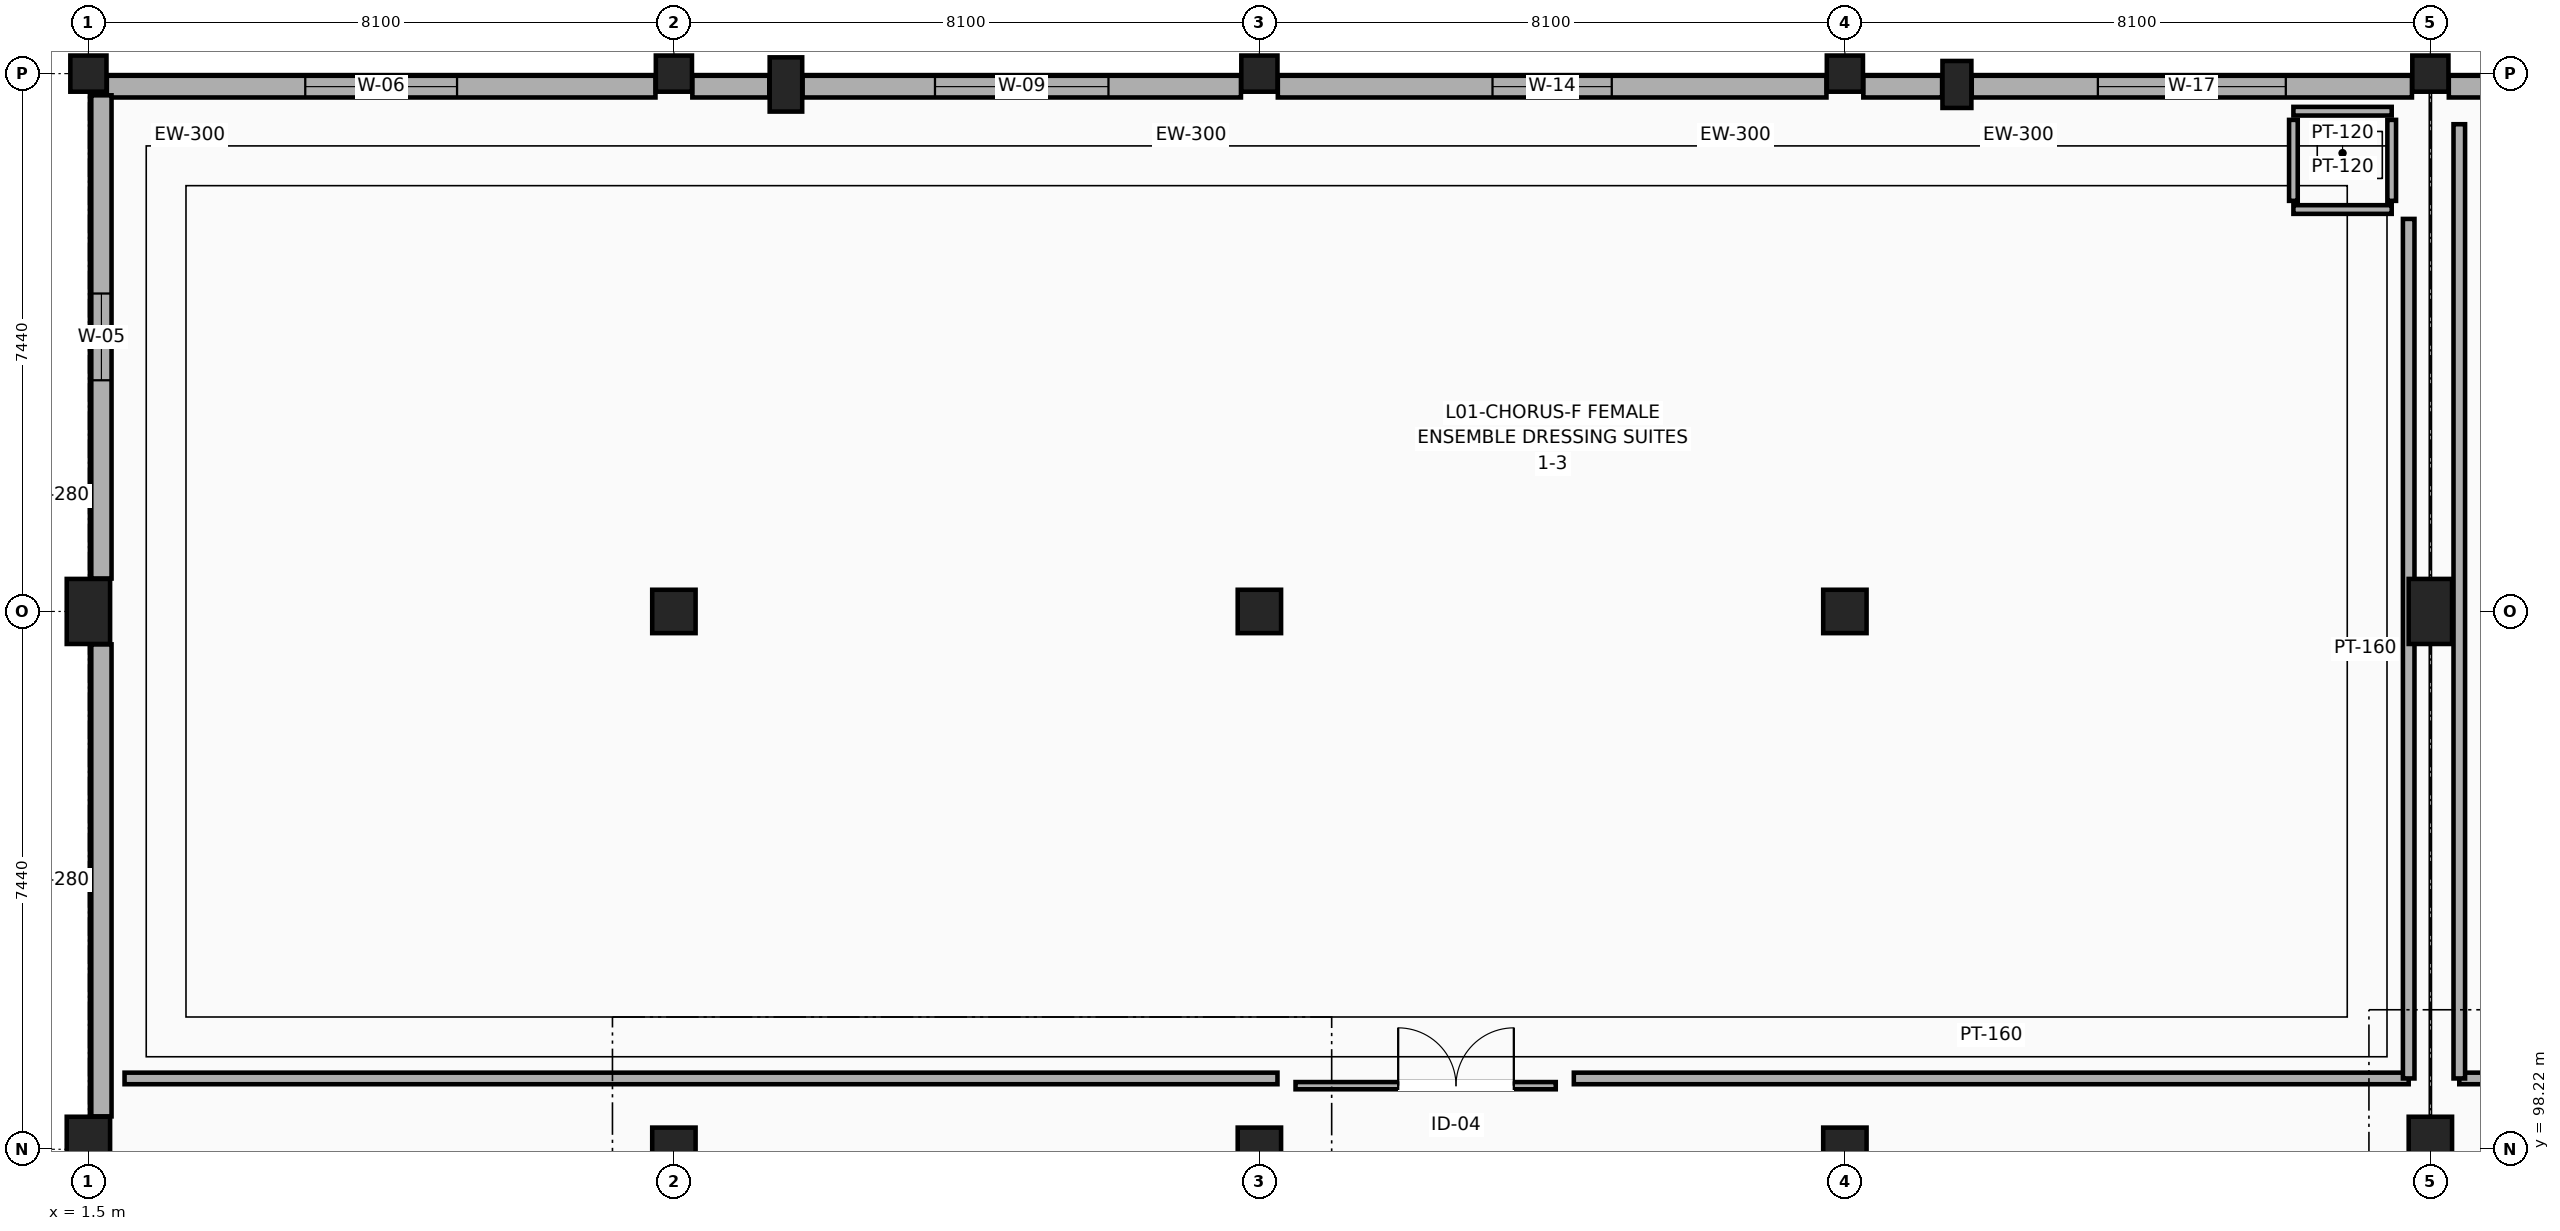
"""IFC4 building model, lengths in metres.
Left out: names, types, materials, properties, quantities, classifications, styles, units other than length and angle.
Written with IfcOpenShell. Run it as: python <this file> out.ifc"""

import sys

from ifc_helpers import new_model, si_unit, direction, frame, frame_2d, origin, origin_2d, place, context, subcontext, project, spatial, rectangle, extrude, element, fill, save


model = new_model("IFC4")
c1 = context("Model", 3, precision=1e-05, world=origin(), true_north=direction((0.0, 1.0)))
c2 = subcontext(c1, "Body", "Model", "MODEL_VIEW")
j1 = project(units=[si_unit("LENGTHUNIT", "METRE"), si_unit("PLANEANGLEUNIT", "RADIAN")], contexts=[c1])
p1 = place(None, origin())
s1 = spatial("IfcSite", under=j1, at=p1, CompositionType="ELEMENT")
p2 = place(p1, origin())
s2 = spatial("IfcBuilding", under=s1, at=p2, CompositionType="ELEMENT")
p3 = place(p2, frame((0.0, 0.0, 5.4)))
s3 = spatial("IfcBuildingStorey", under=s2, at=p3, CompositionType="ELEMENT", Elevation=5.4)
p4 = place(p3, frame((11.15, 112.95, 0.0), z_axis=(0.0, 0.0, 1.0), x_axis=(1.0, 0.0, 0.0)))
e1 = element("IfcColumn", 1, at=p4, inside=s3, PredefinedType="PILASTER", context=c2, shape_type="SweptSolid", body=[
    extrude(rectangle(XDim=0.45, YDim=0.75, at=origin_2d()), origin(), (0.0, 0.0, 1.0), 4.8),
])
p5 = place(p3, frame((27.35, 112.95, 0.0), z_axis=(0.0, 0.0, 1.0), x_axis=(1.0, 0.0, 0.0)))
e2 = element("IfcColumn", 2, at=p5, inside=s3, PredefinedType="PILASTER", context=c2, shape_type="SweptSolid", body=[
    extrude(rectangle(XDim=0.4, YDim=0.65, at=origin_2d()), origin(), (0.0, 0.0, 1.0), 4.8),
])
for number, where, z_axis, x_axis in (
    (3, (1.5, 98.22, 0.0), (0.0, 0.0, 1.0), (1.0, 0.0, 0.0)),
    (4, (1.5, 105.66, 0.0), (0.0, 0.0, 1.0), (1.0, 0.0, 0.0)),
):
    element("IfcColumn", number, at=place(p3, frame(where, z_axis=z_axis, x_axis=x_axis)), inside=s3, PredefinedType="COLUMN", context=c2, shape_type="SweptSolid", body=[
        extrude(rectangle(XDim=0.6, YDim=0.9, at=origin_2d()), origin(), (0.0, 0.0, 1.0), 4.8),
    ])
p6 = place(p3, frame((1.5, 113.1, 0.0), z_axis=(0.0, 0.0, 1.0), x_axis=(1.0, 0.0, 0.0)))
e5 = element("IfcColumn", 5, at=p6, inside=s3, PredefinedType="COLUMN", context=c2, shape_type="SweptSolid", body=[
    extrude(rectangle(XDim=0.5, YDim=0.5, at=origin_2d()), origin(), (0.0, 0.0, 1.0), 4.8),
])
for number, where, z_axis, x_axis in (
    (6, (9.6, 98.22, 0.0), (0.0, 0.0, 1.0), (1.0, 0.0, 0.0)),
    (7, (9.6, 105.66, 0.0), (0.0, 0.0, 1.0), (1.0, 0.0, 0.0)),
):
    element("IfcColumn", number, at=place(p3, frame(where, z_axis=z_axis, x_axis=x_axis)), inside=s3, PredefinedType="COLUMN", context=c2, shape_type="SweptSolid", body=[
        extrude(rectangle(XDim=0.6, YDim=0.6, at=origin_2d()), origin(), (0.0, 0.0, 1.0), 4.8),
    ])
p7 = place(p3, frame((9.6, 113.1, 0.0), z_axis=(0.0, 0.0, 1.0), x_axis=(1.0, 0.0, 0.0)))
e8 = element("IfcColumn", 8, at=p7, inside=s3, PredefinedType="COLUMN", context=c2, shape_type="SweptSolid", body=[
    extrude(rectangle(XDim=0.5, YDim=0.5, at=origin_2d()), origin(), (0.0, 0.0, 1.0), 4.8),
])
for number, where, z_axis, x_axis in (
    (9, (17.7, 98.22, 0.0), (0.0, 0.0, 1.0), (1.0, 0.0, 0.0)),
    (10, (17.7, 105.66, 0.0), (0.0, 0.0, 1.0), (1.0, 0.0, 0.0)),
):
    element("IfcColumn", number, at=place(p3, frame(where, z_axis=z_axis, x_axis=x_axis)), inside=s3, PredefinedType="COLUMN", context=c2, shape_type="SweptSolid", body=[
        extrude(rectangle(XDim=0.6, YDim=0.6, at=origin_2d()), origin(), (0.0, 0.0, 1.0), 4.8),
    ])
p8 = place(p3, frame((17.7, 113.1, 0.0), z_axis=(0.0, 0.0, 1.0), x_axis=(1.0, 0.0, 0.0)))
e11 = element("IfcColumn", 11, at=p8, inside=s3, PredefinedType="COLUMN", context=c2, shape_type="SweptSolid", body=[
    extrude(rectangle(XDim=0.5, YDim=0.5, at=origin_2d()), origin(), (0.0, 0.0, 1.0), 4.8),
])
for number, where, z_axis, x_axis in (
    (12, (25.8, 98.22, 0.0), (0.0, 0.0, 1.0), (1.0, 0.0, 0.0)),
    (13, (25.8, 105.66, 0.0), (0.0, 0.0, 1.0), (1.0, 0.0, 0.0)),
):
    element("IfcColumn", number, at=place(p3, frame(where, z_axis=z_axis, x_axis=x_axis)), inside=s3, PredefinedType="COLUMN", context=c2, shape_type="SweptSolid", body=[
        extrude(rectangle(XDim=0.6, YDim=0.6, at=origin_2d()), origin(), (0.0, 0.0, 1.0), 4.8),
    ])
p9 = place(p3, frame((25.8, 113.1, 0.0), z_axis=(0.0, 0.0, 1.0), x_axis=(1.0, 0.0, 0.0)))
e14 = element("IfcColumn", 14, at=p9, inside=s3, PredefinedType="COLUMN", context=c2, shape_type="SweptSolid", body=[
    extrude(rectangle(XDim=0.5, YDim=0.5, at=origin_2d()), origin(), (0.0, 0.0, 1.0), 4.8),
])
for number, where, z_axis, x_axis in (
    (15, (33.9, 98.22, 0.0), (0.0, 0.0, 1.0), (1.0, 0.0, 0.0)),
    (16, (33.9, 105.66, 0.0), (0.0, 0.0, 1.0), (1.0, 0.0, 0.0)),
):
    element("IfcColumn", number, at=place(p3, frame(where, z_axis=z_axis, x_axis=x_axis)), inside=s3, PredefinedType="COLUMN", context=c2, shape_type="SweptSolid", body=[
        extrude(rectangle(XDim=0.6, YDim=0.9, at=origin_2d()), origin(), (0.0, 0.0, 1.0), 4.8),
    ])
p10 = place(p3, frame((33.9, 113.1, 0.0), z_axis=(0.0, 0.0, 1.0), x_axis=(1.0, 0.0, 0.0)))
e17 = element("IfcColumn", 17, at=p10, inside=s3, PredefinedType="COLUMN", context=c2, shape_type="SweptSolid", body=[
    extrude(rectangle(XDim=0.5, YDim=0.5, at=origin_2d()), origin(), (0.0, 0.0, 1.0), 4.8),
])
p11 = place(p3, frame((1.755, 112.92, 0.0), z_axis=(0.0, 0.0, 1.0), x_axis=(1.0, 0.0, 0.0)))
e18 = element("IfcWall", 18, at=p11, inside=s3, PredefinedType="SOLIDWALL", context=c2, shape_type="SweptSolid", body=[
    extrude(rectangle(XDim=7.59, YDim=0.3, at=frame_2d((3.795, 0.0))), origin(), (0.0, 0.0, 1.0), 3.637),
])
p12 = place(p11, frame((2.745, 0.0, 0.9)))
e19 = element("IfcOpeningElement", 19, at=p12, cuts=e18, PredefinedType="OPENING", context=c2, shape_type="SweptSolid", body=[
    extrude(rectangle(XDim=2.1, YDim=1.5, at=frame_2d((1.05, 0.75))), frame((0.0, 0.16, 0.0), z_axis=(0.0, -1.0, 0.0), x_axis=(1.0, 0.0, 0.0)), (0.0, 0.0, 1.0), 0.32),
])
p13 = place(p3, frame((11.38, 112.92, 0.0), z_axis=(0.0, 0.0, 1.0), x_axis=(1.0, 0.0, 0.0)))
e20 = element("IfcWall", 20, at=p13, inside=s3, PredefinedType="SOLIDWALL", context=c2, shape_type="SweptSolid", body=[
    extrude(rectangle(XDim=6.065, YDim=0.3, at=frame_2d((3.033, 0.0))), origin(), (0.0, 0.0, 1.0), 3.637),
])
p14 = place(p13, frame((1.832, 0.0, 0.9)))
e21 = element("IfcOpeningElement", 21, at=p14, cuts=e20, PredefinedType="OPENING", context=c2, shape_type="SweptSolid", body=[
    extrude(rectangle(XDim=2.4, YDim=2.4, at=frame_2d((1.2, 1.2))), frame((0.0, 0.16, 0.0), z_axis=(0.0, -1.0, 0.0), x_axis=(1.0, 0.0, 0.0)), (0.0, 0.0, 1.0), 0.32),
])
p15 = place(p3, frame((9.855, 112.92, 0.0), z_axis=(0.0, 0.0, 1.0), x_axis=(1.0, 0.0, 0.0)))
e22 = element("IfcWall", 22, at=p15, inside=s3, PredefinedType="SOLIDWALL", context=c2, shape_type="SweptSolid", body=[
    extrude(rectangle(XDim=1.065, YDim=0.3, at=frame_2d((0.532, 0.0))), origin(), (0.0, 0.0, 1.0), 3.637),
])
p16 = place(p3, frame((17.955, 112.92, 0.0), z_axis=(0.0, 0.0, 1.0), x_axis=(1.0, 0.0, 0.0)))
e23 = element("IfcWall", 23, at=p16, inside=s3, PredefinedType="SOLIDWALL", context=c2, shape_type="SweptSolid", body=[
    extrude(rectangle(XDim=7.59, YDim=0.3, at=frame_2d((3.795, 0.0))), origin(), (0.0, 0.0, 1.0), 3.637),
])
p17 = place(p16, frame((2.97, 0.0, 0.9)))
e24 = element("IfcOpeningElement", 24, at=p17, cuts=e23, PredefinedType="OPENING", context=c2, shape_type="SweptSolid", body=[
    extrude(rectangle(XDim=1.65, YDim=2.25, at=frame_2d((0.825, 1.125))), frame((0.0, 0.16, 0.0), z_axis=(0.0, -1.0, 0.0), x_axis=(1.0, 0.0, 0.0)), (0.0, 0.0, 1.0), 0.32),
])
p18 = place(p3, frame((27.555, 112.92, 0.0), z_axis=(0.0, 0.0, 1.0), x_axis=(1.0, 0.0, 0.0)))
e25 = element("IfcWall", 25, at=p18, inside=s3, PredefinedType="SOLIDWALL", context=c2, shape_type="SweptSolid", body=[
    extrude(rectangle(XDim=6.09, YDim=0.3, at=frame_2d((3.045, 0.0))), origin(), (0.0, 0.0, 1.0), 3.637),
])
p19 = place(p18, frame((1.745, 0.0, 0.9)))
e26 = element("IfcOpeningElement", 26, at=p19, cuts=e25, PredefinedType="OPENING", context=c2, shape_type="SweptSolid", body=[
    extrude(rectangle(XDim=2.6, YDim=2.1, at=frame_2d((1.3, 1.05))), frame((0.0, 0.16, 0.0), z_axis=(0.0, -1.0, 0.0), x_axis=(1.0, 0.0, 0.0)), (0.0, 0.0, 1.0), 0.32),
])
p20 = place(p3, frame((26.055, 112.92, 0.0), z_axis=(0.0, 0.0, 1.0), x_axis=(1.0, 0.0, 0.0)))
e27 = element("IfcWall", 27, at=p20, inside=s3, PredefinedType="SOLIDWALL", context=c2, shape_type="SweptSolid", body=[
    extrude(rectangle(XDim=1.09, YDim=0.3, at=frame_2d((0.545, 0.0))), origin(), (0.0, 0.0, 1.0), 3.637),
])
p21 = place(p3, frame((34.155, 112.92, 0.0), z_axis=(0.0, 0.0, 1.0), x_axis=(1.0, 0.0, 0.0)))
e28 = element("IfcWall", 28, at=p21, inside=s3, PredefinedType="SOLIDWALL", context=c2, shape_type="SweptSolid", body=[
    extrude(rectangle(XDim=1.065, YDim=0.3, at=frame_2d((0.532, 0.0))), origin(), (0.0, 0.0, 1.0), 3.637),
])
p22 = place(p3, frame((1.68, 98.675, 0.0), z_axis=(0.0, 0.0, 1.0), x_axis=(0.0, 1.0, 0.0)))
e29 = element("IfcWall", 29, at=p22, inside=s3, PredefinedType="SOLIDWALL", context=c2, shape_type="SweptSolid", body=[
    extrude(rectangle(XDim=6.53, YDim=0.28, at=frame_2d((3.265, 0.0))), origin(), (0.0, 0.0, 1.0), 4.187),
])
p23 = place(p3, frame((1.68, 106.115, 0.0), z_axis=(0.0, 0.0, 1.0), x_axis=(0.0, 1.0, 0.0)))
e30 = element("IfcWall", 30, at=p23, inside=s3, PredefinedType="SOLIDWALL", context=c2, shape_type="SweptSolid", body=[
    extrude(rectangle(XDim=6.685, YDim=0.28, at=frame_2d((3.343, 0.0))), origin(), (0.0, 0.0, 1.0), 4.187),
])
p24 = place(p23, frame((2.743, 0.0, 0.95)))
e31 = element("IfcOpeningElement", 31, at=p24, cuts=e30, PredefinedType="OPENING", context=c2, shape_type="SweptSolid", body=[
    extrude(rectangle(XDim=1.2, YDim=1.8, at=frame_2d((0.6, 0.9))), frame((0.0, 0.15, 0.0), z_axis=(0.0, -1.0, 0.0), x_axis=(1.0, 0.0, 0.0)), (0.0, 0.0, 1.0), 0.3),
])
for number, where, z_axis, x_axis in (
    (32, (32.005, 111.22, 0.0), (0.0, 0.0, 1.0), (1.0, 0.0, 0.0)),
    (33, (32.005, 112.58, 0.0), (0.0, 0.0, 1.0), (1.0, 0.0, 0.0)),
):
    element("IfcWall", number, at=place(p3, frame(where, z_axis=z_axis, x_axis=x_axis)), inside=s3, PredefinedType="PARTITIONING", context=c2, shape_type="SweptSolid", body=[
        extrude(rectangle(XDim=1.36, YDim=0.12, at=frame_2d((0.68, 0.0))), origin(), (0.0, 0.0, 1.0), 4.505),
    ])
for number, where, z_axis, x_axis in (
    (34, (32.005, 111.34, 0.0), (0.0, 0.0, 1.0), (0.0, 1.0, 0.0)),
    (35, (33.365, 111.34, 0.0), (0.0, 0.0, 1.0), (0.0, 1.0, 0.0)),
):
    element("IfcWall", number, at=place(p3, frame(where, z_axis=z_axis, x_axis=x_axis)), inside=s3, PredefinedType="PARTITIONING", context=c2, shape_type="SweptSolid", body=[
        extrude(rectangle(XDim=1.12, YDim=0.12, at=frame_2d((0.56, 0.0))), origin(), (0.0, 0.0, 1.0), 4.505),
    ])
p25 = place(p3, frame((18.2, 99.1, 0.0), z_axis=(0.0, 0.0, 1.0), x_axis=(1.0, 0.0, 0.0)))
e36 = element("IfcWall", 36, at=p25, inside=s3, PredefinedType="PARTITIONING", context=c2, shape_type="SweptSolid", body=[
    extrude(rectangle(XDim=3.6, YDim=0.1, at=frame_2d((1.8, 0.0))), origin(), (0.0, 0.0, 1.0), 4.187),
])
p26 = place(p25, frame((1.42, 0.0, 0.0)))
e37 = element("IfcOpeningElement", 37, at=p26, cuts=e36, PredefinedType="OPENING", context=c2, shape_type="SweptSolid", body=[
    extrude(rectangle(XDim=1.6, YDim=2.3, at=frame_2d((0.8, 1.15))), frame((0.0, 0.06, 0.0), z_axis=(0.0, -1.0, 0.0), x_axis=(1.0, 0.0, 0.0)), (0.0, 0.0, 1.0), 0.12),
])
p27 = place(p3, frame((2.0, 99.2, 0.0), z_axis=(0.0, 0.0, 1.0), x_axis=(1.0, 0.0, 0.0)))
e38 = element("IfcWall", 38, at=p27, inside=s3, PredefinedType="PARTITIONING", context=c2, shape_type="SweptSolid", body=[
    extrude(rectangle(XDim=15.95, YDim=0.16, at=frame_2d((7.975, 0.0))), origin(), (0.0, 0.0, 1.0), 3.837),
])
p28 = place(p3, frame((22.05, 99.2, 0.0), z_axis=(0.0, 0.0, 1.0), x_axis=(1.0, 0.0, 0.0)))
e39 = element("IfcWall", 39, at=p28, inside=s3, PredefinedType="PARTITIONING", context=c2, shape_type="SweptSolid", body=[
    extrude(rectangle(XDim=11.55, YDim=0.16, at=frame_2d((5.775, 0.0))), origin(), (0.0, 0.0, 1.0), 3.837),
])
p29 = place(p3, frame((33.6, 99.2, 0.0), z_axis=(0.0, 0.0, 1.0), x_axis=(0.0, 1.0, 0.0)))
e40 = element("IfcWall", 40, at=p29, inside=s3, PredefinedType="PARTITIONING", context=c2, shape_type="SweptSolid", body=[
    extrude(rectangle(XDim=11.89, YDim=0.16, at=frame_2d((5.945, 0.0))), origin(), (0.0, 0.0, 1.0), 3.687),
])
p30 = place(p3, frame((34.3, 99.2, 0.0), z_axis=(0.0, 0.0, 1.0), x_axis=(1.0, 0.0, 0.0)))
e41 = element("IfcWall", 41, at=p30, inside=s3, PredefinedType="PARTITIONING", context=c2, shape_type="SweptSolid", body=[
    extrude(rectangle(XDim=7.85, YDim=0.16, at=frame_2d((3.925, 0.0))), origin(), (0.0, 0.0, 1.0), 3.837),
])
p31 = place(p3, frame((34.3, 99.2, 0.0), z_axis=(0.0, 0.0, 1.0), x_axis=(0.0, 1.0, 0.0)))
e42 = element("IfcWall", 42, at=p31, inside=s3, PredefinedType="PARTITIONING", context=c2, shape_type="SweptSolid", body=[
    extrude(rectangle(XDim=13.2, YDim=0.16, at=frame_2d((6.6, 0.0))), origin(), (0.0, 0.0, 1.0), 3.987),
])
p32 = place(p12, origin())
e43 = element("IfcWindow", 43, at=p32, inside=s3, PartitioningType="SINGLE_PANEL", PredefinedType="WINDOW", context=c2, shape_type="SweptSolid", body=[
    extrude(rectangle(XDim=2.1, YDim=1.5, at=frame_2d((1.05, 0.75))), frame((0.0, 0.03, 0.0), z_axis=(0.0, -1.0, 0.0), x_axis=(1.0, 0.0, 0.0)), (0.0, 0.0, 1.0), 0.06),
])
fill(e19, e43)
p33 = place(p14, origin())
e44 = element("IfcWindow", 44, at=p33, inside=s3, PartitioningType="SINGLE_PANEL", PredefinedType="WINDOW", context=c2, shape_type="SweptSolid", body=[
    extrude(rectangle(XDim=2.4, YDim=2.4, at=frame_2d((1.2, 1.2))), frame((0.0, 0.03, 0.0), z_axis=(0.0, -1.0, 0.0), x_axis=(1.0, 0.0, 0.0)), (0.0, 0.0, 1.0), 0.06),
])
fill(e21, e44)
p34 = place(p17, origin())
e45 = element("IfcWindow", 45, at=p34, inside=s3, PartitioningType="SINGLE_PANEL", PredefinedType="WINDOW", context=c2, shape_type="SweptSolid", body=[
    extrude(rectangle(XDim=1.65, YDim=2.25, at=frame_2d((0.825, 1.125))), frame((0.0, 0.03, 0.0), z_axis=(0.0, -1.0, 0.0), x_axis=(1.0, 0.0, 0.0)), (0.0, 0.0, 1.0), 0.06),
])
fill(e24, e45)
p35 = place(p19, origin())
e46 = element("IfcWindow", 46, at=p35, inside=s3, PartitioningType="SINGLE_PANEL", PredefinedType="WINDOW", context=c2, shape_type="SweptSolid", body=[
    extrude(rectangle(XDim=2.6, YDim=2.1, at=frame_2d((1.3, 1.05))), frame((0.0, 0.03, 0.0), z_axis=(0.0, -1.0, 0.0), x_axis=(1.0, 0.0, 0.0)), (0.0, 0.0, 1.0), 0.06),
])
fill(e26, e46)
p36 = place(p24, origin())
e47 = element("IfcWindow", 47, at=p36, inside=s3, PartitioningType="SINGLE_PANEL", PredefinedType="WINDOW", context=c2, shape_type="SweptSolid", body=[
    extrude(rectangle(XDim=1.2, YDim=1.8, at=frame_2d((0.6, 0.9))), frame((0.0, 0.03, 0.0), z_axis=(0.0, -1.0, 0.0), x_axis=(1.0, 0.0, 0.0)), (0.0, 0.0, 1.0), 0.06),
])
fill(e31, e47)
p37 = place(p26, origin())
e48 = element("IfcDoor", 48, at=p37, inside=s3, OperationType="DOUBLE_DOOR_SINGLE_SWING", PredefinedType="DOOR", context=c2, shape_type="SweptSolid", body=[
    extrude(rectangle(XDim=1.6, YDim=2.3, at=frame_2d((0.8, 1.15))), frame((0.0, 0.025, 0.0), z_axis=(0.0, -1.0, 0.0), x_axis=(1.0, 0.0, 0.0)), (0.0, 0.0, 1.0), 0.05),
])
fill(e37, e48)
save(model, sys.argv[1])
